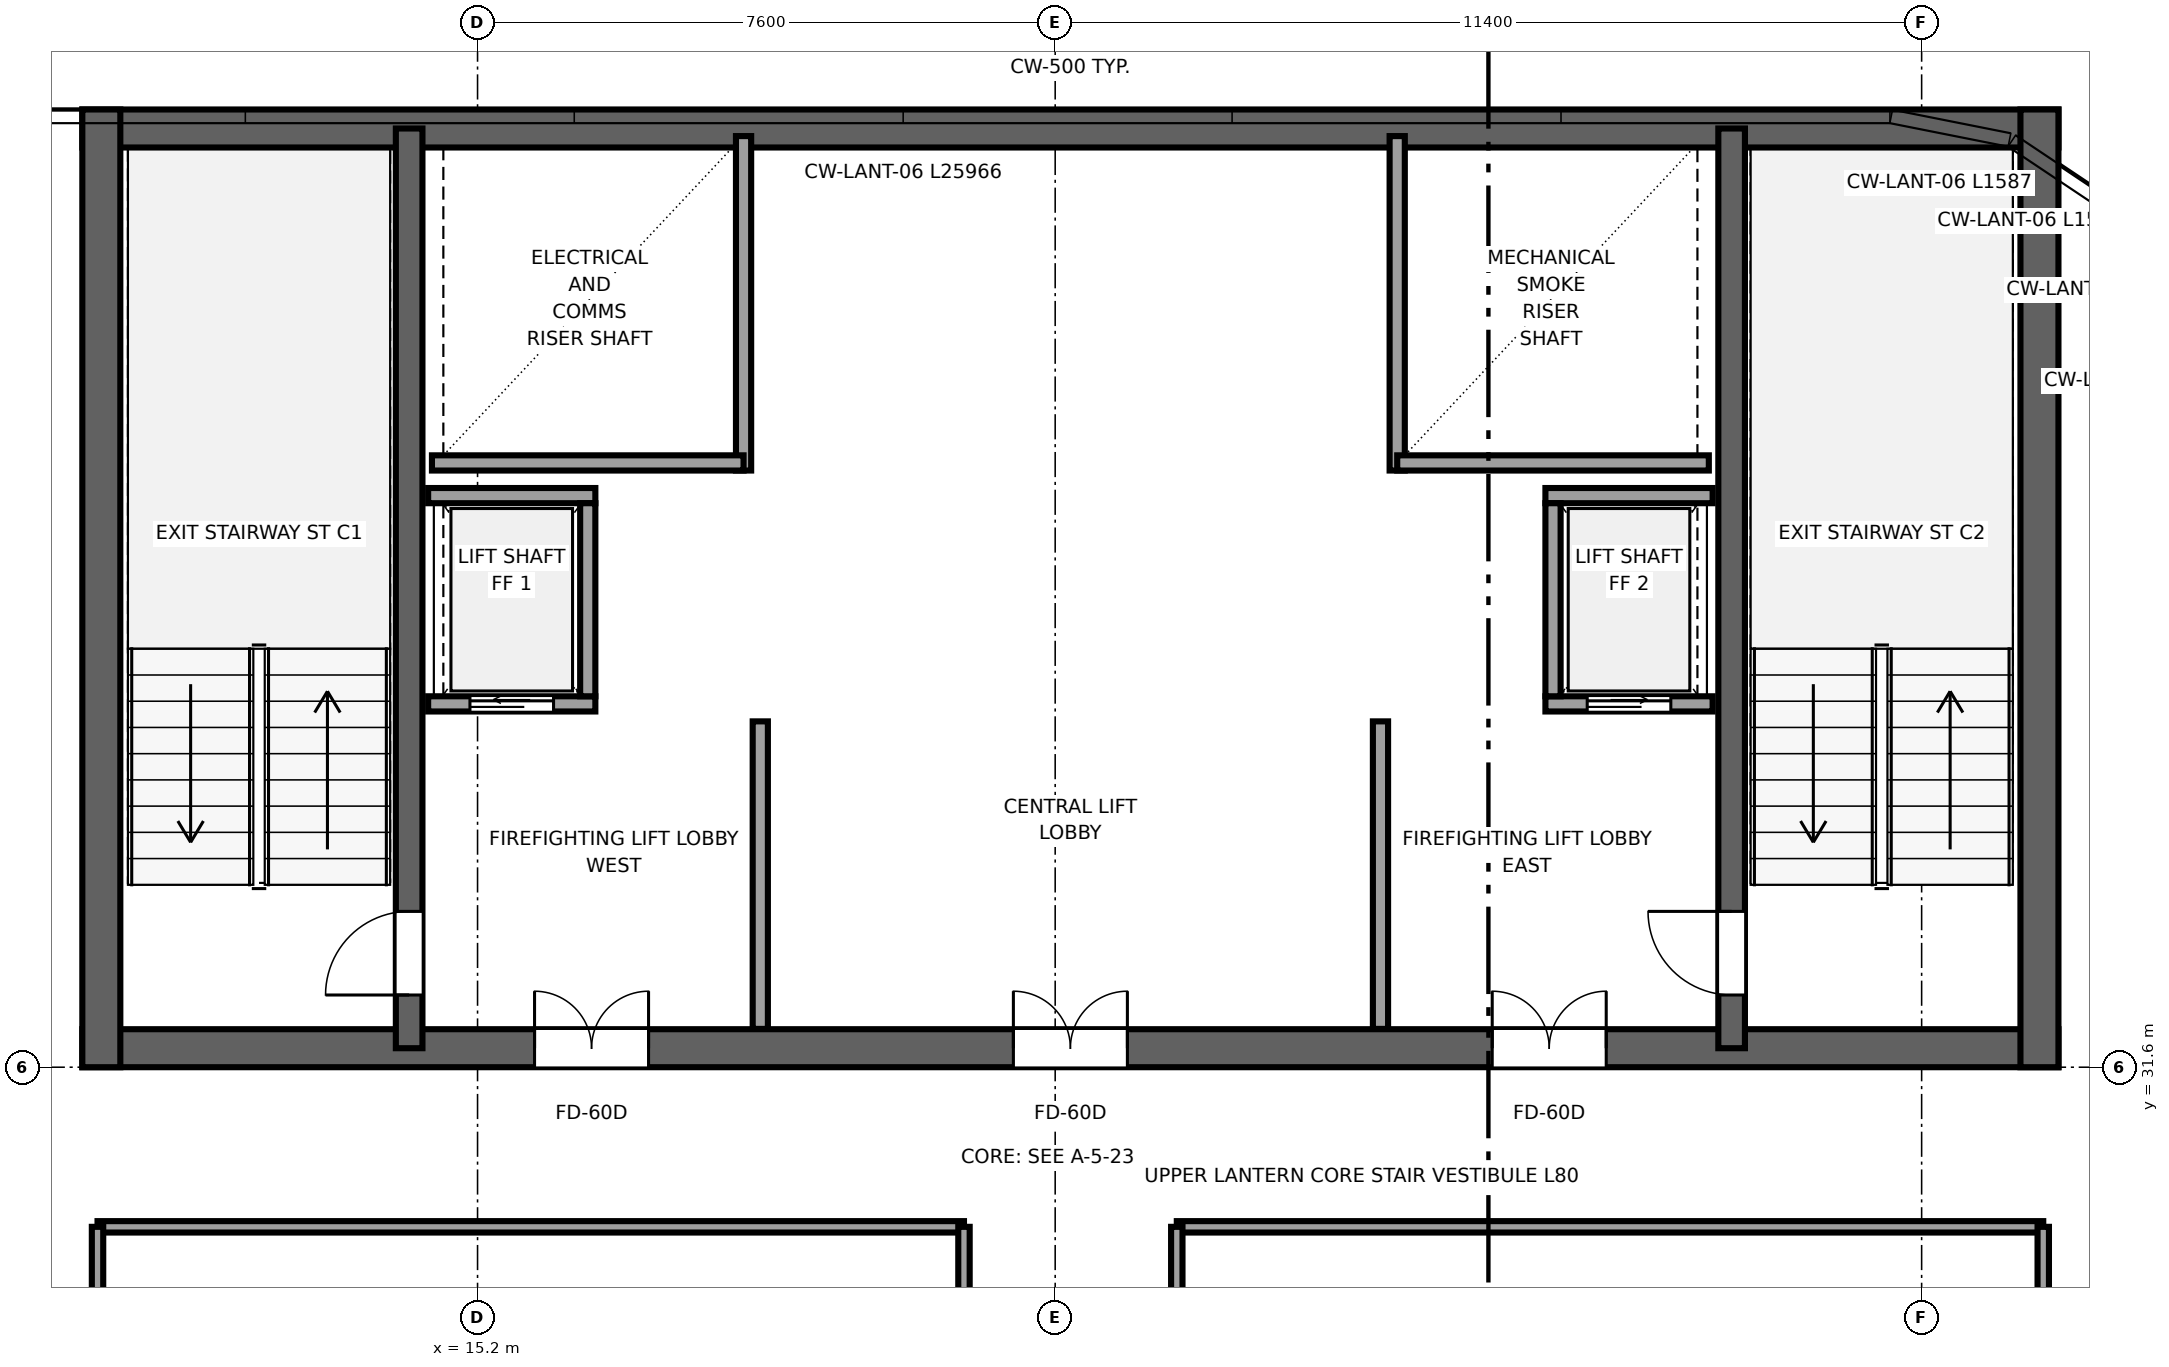
"""IFC4 building model, lengths in metres.
Left out: names, types, materials, properties, quantities, classifications, styles, units other than length and angle.
Written with IfcOpenShell. Run it as: python <this file> out.ifc"""

import sys

from ifc_helpers import new_model, si_unit, direction, frame, frame_2d, origin, place, context, subcontext, project, spatial, rectangle, extrude, source, transform, mapped, element, fill, save


model = new_model("IFC4")
c1 = context("Model", 3, precision=1e-05, world=origin(), true_north=direction((0.0, 1.0)))
c2 = subcontext(c1, "Body", "Model", "MODEL_VIEW")
j1 = project(units=[si_unit("LENGTHUNIT", "METRE"), si_unit("PLANEANGLEUNIT", "RADIAN")], contexts=[c1])
p1 = place(None, origin())
s1 = spatial("IfcSite", under=j1, at=p1, CompositionType="ELEMENT")
p2 = place(p1, origin())
s2 = spatial("IfcBuilding", under=s1, at=p2, CompositionType="ELEMENT")
p3 = place(p2, frame((0.0, 0.0, 302.35)))
s3 = spatial("IfcBuildingStorey", under=s2, at=p3, CompositionType="ELEMENT", Elevation=302.35)
p4 = place(p3, frame((10.0, 31.85, 0.0), z_axis=(0.0, 0.0, 1.0), x_axis=(1.0, 0.0, 0.0)))
e1 = element("IfcWall", 1, at=p4, inside=s3, PredefinedType="SHEAR", context=c2, shape_type="SweptSolid", body=[
    extrude(rectangle(XDim=26.0, YDim=0.5, at=frame_2d((13.0, 0.0))), origin(), (0.0, 0.0, 1.0), 3.8),
])
p5 = place(p4, frame((7.45, 0.0, 0.0), z_axis=(0.0, 0.0, 1.0), x_axis=(-1.0, 0.0, 0.0)))
e2 = element("IfcOpeningElement", 2, at=p5, cuts=e1, PredefinedType="OPENING", context=c2, shape_type="SweptSolid", body=[
    extrude(rectangle(XDim=1.5, YDim=2.04, at=frame_2d((0.75, 1.02))), frame((0.0, 0.26, 0.0), z_axis=(0.0, -1.0, 0.0), x_axis=(1.0, 0.0, 0.0)), (0.0, 0.0, 1.0), 0.52),
])
p6 = place(p4, frame((13.75, 0.0, 0.0), z_axis=(0.0, 0.0, 1.0), x_axis=(-1.0, 0.0, 0.0)))
e3 = element("IfcOpeningElement", 3, at=p6, cuts=e1, PredefinedType="OPENING", context=c2, shape_type="SweptSolid", body=[
    extrude(rectangle(XDim=1.5, YDim=2.04, at=frame_2d((0.75, 1.02))), frame((0.0, 0.26, 0.0), z_axis=(0.0, -1.0, 0.0), x_axis=(1.0, 0.0, 0.0)), (0.0, 0.0, 1.0), 0.52),
])
p7 = place(p4, frame((20.05, 0.0, 0.0), z_axis=(0.0, 0.0, 1.0), x_axis=(-1.0, 0.0, 0.0)))
e4 = element("IfcOpeningElement", 4, at=p7, cuts=e1, PredefinedType="OPENING", context=c2, shape_type="SweptSolid", body=[
    extrude(rectangle(XDim=1.5, YDim=2.04, at=frame_2d((0.75, 1.02))), frame((0.0, 0.26, 0.0), z_axis=(0.0, -1.0, 0.0), x_axis=(1.0, 0.0, 0.0)), (0.0, 0.0, 1.0), 0.52),
])
p8 = place(p3, frame((10.0, 43.95, 0.0), z_axis=(0.0, 0.0, 1.0), x_axis=(1.0, 0.0, 0.0)))
e5 = element("IfcWall", 5, at=p8, inside=s3, PredefinedType="SHEAR", context=c2, shape_type="SweptSolid", body=[
    extrude(rectangle(XDim=26.0, YDim=0.5, at=frame_2d((13.0, 0.0))), origin(), (0.0, 0.0, 1.0), 3.8),
])
for number, where, z_axis, x_axis in (
    (6, (10.25, 31.6, 0.0), (0.0, 0.0, 1.0), (0.0, 1.0, 0.0)),
    (7, (35.75, 31.6, 0.0), (0.0, 0.0, 1.0), (0.0, 1.0, 0.0)),
):
    element("IfcWall", number, at=place(p3, frame(where, z_axis=z_axis, x_axis=x_axis)), inside=s3, PredefinedType="SHEAR", context=c2, shape_type="SweptSolid", body=[
        extrude(rectangle(XDim=12.6, YDim=0.5, at=frame_2d((6.3, 0.0))), origin(), (0.0, 0.0, 1.0), 3.8),
    ])
p9 = place(p3, frame((14.3, 31.85, 0.0), z_axis=(0.0, 0.0, 1.0), x_axis=(0.0, 1.0, 0.0)))
e8 = element("IfcWall", 8, at=p9, inside=s3, PredefinedType="SHEAR", context=c2, shape_type="SweptSolid", body=[
    extrude(rectangle(XDim=12.1, YDim=0.35, at=frame_2d((6.05, 0.0))), origin(), (0.0, 0.0, 1.0), 3.8),
])
p10 = place(p9, frame((0.7, 0.0, 0.0)))
e9 = element("IfcOpeningElement", 9, at=p10, cuts=e8, PredefinedType="OPENING", context=c2, shape_type="SweptSolid", body=[
    extrude(rectangle(XDim=1.1, YDim=2.12, at=frame_2d((0.55, 1.06))), frame((0.0, 0.185, 0.0), z_axis=(0.0, -1.0, 0.0), x_axis=(1.0, 0.0, 0.0)), (0.0, 0.0, 1.0), 0.37),
])
p11 = place(p3, frame((31.7, 31.85, 0.0), z_axis=(0.0, 0.0, 1.0), x_axis=(0.0, 1.0, 0.0)))
e10 = element("IfcWall", 10, at=p11, inside=s3, PredefinedType="SHEAR", context=c2, shape_type="SweptSolid", body=[
    extrude(rectangle(XDim=12.1, YDim=0.35, at=frame_2d((6.05, 0.0))), origin(), (0.0, 0.0, 1.0), 3.8),
])
p12 = place(p11, frame((1.8, 0.0, 0.0), z_axis=(0.0, 0.0, 1.0), x_axis=(-1.0, 0.0, 0.0)))
e11 = element("IfcOpeningElement", 11, at=p12, cuts=e10, PredefinedType="OPENING", context=c2, shape_type="SweptSolid", body=[
    extrude(rectangle(XDim=1.1, YDim=2.12, at=frame_2d((0.55, 1.06))), frame((0.0, 0.185, 0.0), z_axis=(0.0, -1.0, 0.0), x_axis=(1.0, 0.0, 0.0)), (0.0, 0.0, 1.0), 0.37),
])
p13 = place(p3, frame((18.7, 39.45, 0.0), z_axis=(0.0, 0.0, 1.0), x_axis=(0.0, 1.0, 0.0)))
e12 = element("IfcWall", 12, at=p13, inside=s3, PredefinedType="SOLIDWALL", context=c2, shape_type="SweptSolid", body=[
    extrude(rectangle(XDim=4.4, YDim=0.2, at=frame_2d((2.2, 0.0))), origin(), (0.0, 0.0, 1.0), 3.58),
])
p14 = place(p3, frame((14.6, 39.55, 0.0), z_axis=(0.0, 0.0, 1.0), x_axis=(1.0, 0.0, 0.0)))
e13 = element("IfcWall", 13, at=p14, inside=s3, PredefinedType="SOLIDWALL", context=c2, shape_type="SweptSolid", body=[
    extrude(rectangle(XDim=4.1, YDim=0.2, at=frame_2d((2.05, 0.0))), origin(), (0.0, 0.0, 1.0), 3.58),
])
p15 = place(p3, frame((27.3, 39.45, 0.0), z_axis=(0.0, 0.0, 1.0), x_axis=(0.0, 1.0, 0.0)))
e14 = element("IfcWall", 14, at=p15, inside=s3, PredefinedType="SOLIDWALL", context=c2, shape_type="SweptSolid", body=[
    extrude(rectangle(XDim=4.4, YDim=0.2, at=frame_2d((2.2, 0.0))), origin(), (0.0, 0.0, 1.0), 3.58),
])
p16 = place(p3, frame((27.3, 39.55, 0.0), z_axis=(0.0, 0.0, 1.0), x_axis=(1.0, 0.0, 0.0)))
e15 = element("IfcWall", 15, at=p16, inside=s3, PredefinedType="SOLIDWALL", context=c2, shape_type="SweptSolid", body=[
    extrude(rectangle(XDim=4.1, YDim=0.2, at=frame_2d((2.05, 0.0))), origin(), (0.0, 0.0, 1.0), 3.58),
])
for number, where, z_axis, x_axis in (
    (16, (18.92, 32.104, 0.0), (0.0, 0.0, 1.0), (0.0, 1.0, 0.0)),
    (17, (27.08, 32.104, 0.0), (0.0, 0.0, 1.0), (0.0, 1.0, 0.0)),
):
    element("IfcWall", number, at=place(p3, frame(where, z_axis=z_axis, x_axis=x_axis)), inside=s3, PredefinedType="SOLIDWALL", context=c2, shape_type="SweptSolid", body=[
        extrude(rectangle(XDim=4.046, YDim=0.2, at=frame_2d((2.023, 0.0))), origin(), (0.0, 0.0, 1.0), 3.58),
    ])
p17 = place(p3, frame((29.25, 36.38, 0.0), z_axis=(0.0, 0.0, 1.0), x_axis=(1.0, 0.0, 0.0)))
e18 = element("IfcWall", 18, at=p17, inside=s3, PredefinedType="SOLIDWALL", context=c2, shape_type="SweptSolid", body=[
    extrude(rectangle(XDim=2.2, YDim=0.2, at=frame_2d((1.1, 0.0))), origin(), (0.0, 0.0, 1.0), 3.58),
])
p18 = place(p17, frame((0.55, 0.0, 0.0)))
e19 = element("IfcOpeningElement", 19, at=p18, cuts=e18, PredefinedType="OPENING", context=c2, shape_type="SweptSolid", body=[
    extrude(rectangle(XDim=1.1, YDim=2.12, at=frame_2d((0.55, 1.06))), frame((0.0, 0.11, 0.0), z_axis=(0.0, -1.0, 0.0), x_axis=(1.0, 0.0, 0.0)), (0.0, 0.0, 1.0), 0.22),
])
p19 = place(p3, frame((29.25, 39.12, 0.0), z_axis=(0.0, 0.0, 1.0), x_axis=(1.0, 0.0, 0.0)))
e20 = element("IfcWall", 20, at=p19, inside=s3, PredefinedType="SOLIDWALL", context=c2, shape_type="SweptSolid", body=[
    extrude(rectangle(XDim=2.2, YDim=0.2, at=frame_2d((1.1, 0.0))), origin(), (0.0, 0.0, 1.0), 3.58),
])
p20 = place(p3, frame((29.35, 36.48, 0.0), z_axis=(0.0, 0.0, 1.0), x_axis=(0.0, 1.0, 0.0)))
e21 = element("IfcWall", 21, at=p20, inside=s3, PredefinedType="SOLIDWALL", context=c2, shape_type="SweptSolid", body=[
    extrude(rectangle(XDim=2.54, YDim=0.2, at=frame_2d((1.27, 0.0))), origin(), (0.0, 0.0, 1.0), 3.58),
])
p21 = place(p3, frame((14.55, 36.38, 0.0), z_axis=(0.0, 0.0, 1.0), x_axis=(1.0, 0.0, 0.0)))
e22 = element("IfcWall", 22, at=p21, inside=s3, PredefinedType="SOLIDWALL", context=c2, shape_type="SweptSolid", body=[
    extrude(rectangle(XDim=2.2, YDim=0.2, at=frame_2d((1.1, 0.0))), origin(), (0.0, 0.0, 1.0), 3.58),
])
p22 = place(p21, frame((0.55, 0.0, 0.0)))
e23 = element("IfcOpeningElement", 23, at=p22, cuts=e22, PredefinedType="OPENING", context=c2, shape_type="SweptSolid", body=[
    extrude(rectangle(XDim=1.1, YDim=2.12, at=frame_2d((0.55, 1.06))), frame((0.0, 0.11, 0.0), z_axis=(0.0, -1.0, 0.0), x_axis=(1.0, 0.0, 0.0)), (0.0, 0.0, 1.0), 0.22),
])
p23 = place(p3, frame((14.55, 39.12, 0.0), z_axis=(0.0, 0.0, 1.0), x_axis=(1.0, 0.0, 0.0)))
e24 = element("IfcWall", 24, at=p23, inside=s3, PredefinedType="SOLIDWALL", context=c2, shape_type="SweptSolid", body=[
    extrude(rectangle(XDim=2.2, YDim=0.2, at=frame_2d((1.1, 0.0))), origin(), (0.0, 0.0, 1.0), 3.58),
])
p24 = place(p3, frame((16.65, 36.48, 0.0), z_axis=(0.0, 0.0, 1.0), x_axis=(0.0, 1.0, 0.0)))
e25 = element("IfcWall", 25, at=p24, inside=s3, PredefinedType="SOLIDWALL", context=c2, shape_type="SweptSolid", body=[
    extrude(rectangle(XDim=2.54, YDim=0.2, at=frame_2d((1.27, 0.0))), origin(), (0.0, 0.0, 1.0), 3.58),
])
p25 = place(p3, frame((10.2, 29.5, 0.0), z_axis=(0.0, 0.0, 1.0), x_axis=(1.0, 0.0, 0.0)))
e26 = element("IfcWall", 26, at=p25, inside=s3, PredefinedType="PARTITIONING", context=c2, shape_type="SweptSolid", body=[
    extrude(rectangle(XDim=11.4, YDim=0.15, at=frame_2d((5.7, 0.0))), origin(), (0.0, 0.0, 1.0), 3.58),
])
for number, where, z_axis, x_axis in (
    (27, (10.2, 22.0, 0.0), (0.0, 0.0, 1.0), (0.0, 1.0, 0.0)),
    (28, (21.6, 22.0, 0.0), (0.0, 0.0, 1.0), (0.0, 1.0, 0.0)),
):
    element("IfcWall", number, at=place(p3, frame(where, z_axis=z_axis, x_axis=x_axis)), inside=s3, PredefinedType="PARTITIONING", context=c2, shape_type="SweptSolid", body=[
        extrude(rectangle(XDim=7.5, YDim=0.15, at=frame_2d((3.75, 0.0))), origin(), (0.0, 0.0, 1.0), 3.58),
    ])
p26 = place(p3, frame((24.4, 29.5, 0.0), z_axis=(0.0, 0.0, 1.0), x_axis=(1.0, 0.0, 0.0)))
e29 = element("IfcWall", 29, at=p26, inside=s3, PredefinedType="PARTITIONING", context=c2, shape_type="SweptSolid", body=[
    extrude(rectangle(XDim=11.4, YDim=0.15, at=frame_2d((5.7, 0.0))), origin(), (0.0, 0.0, 1.0), 3.58),
])
for number, where, z_axis, x_axis in (
    (30, (24.4, 22.0, 0.0), (0.0, 0.0, 1.0), (0.0, 1.0, 0.0)),
    (31, (35.8, 22.0, 0.0), (0.0, 0.0, 1.0), (0.0, 1.0, 0.0)),
):
    element("IfcWall", number, at=place(p3, frame(where, z_axis=z_axis, x_axis=x_axis)), inside=s3, PredefinedType="PARTITIONING", context=c2, shape_type="SweptSolid", body=[
        extrude(rectangle(XDim=7.5, YDim=0.15, at=frame_2d((3.75, 0.0))), origin(), (0.0, 0.0, 1.0), 3.58),
    ])
m1 = source(origin(), c2, "Body", "SweptSolid", [
    extrude(rectangle(XDim=1.1, YDim=2.12, at=frame_2d((0.55, 1.06))), frame((0.0, 0.025, 0.0), z_axis=(0.0, -1.0, 0.0), x_axis=(1.0, 0.0, 0.0)), (0.0, 0.0, 1.0), 0.05),
])
p27 = place(p10, origin())
e32 = element("IfcDoor", 32, at=p27, inside=s3, OperationType="SINGLE_SWING_LEFT", PredefinedType="DOOR", context=c2, shape_type="MappedRepresentation", body=[
    mapped(m1, transform((0.0, 0.0, 0.0), x_axis=(1.0, 0.0, 0.0), y_axis=(0.0, 1.0, 0.0), z_axis=(0.0, 0.0, 1.0), scale=1.0)),
])
fill(e9, e32)
p28 = place(p12, origin())
e33 = element("IfcDoor", 33, at=p28, inside=s3, OperationType="SINGLE_SWING_RIGHT", PredefinedType="DOOR", context=c2, shape_type="MappedRepresentation", body=[
    mapped(m1, transform((0.0, 0.0, 0.0), x_axis=(1.0, 0.0, 0.0), y_axis=(0.0, 1.0, 0.0), z_axis=(0.0, 0.0, 1.0), scale=1.0)),
])
fill(e11, e33)
m2 = source(origin(), c2, "Body", "SweptSolid", [
    extrude(rectangle(XDim=1.5, YDim=2.04, at=frame_2d((0.75, 1.02))), frame((0.0, 0.025, 0.0), z_axis=(0.0, -1.0, 0.0), x_axis=(1.0, 0.0, 0.0)), (0.0, 0.0, 1.0), 0.05),
])
p29 = place(p5, origin())
e34 = element("IfcDoor", 34, at=p29, inside=s3, OperationType="DOUBLE_DOOR_SINGLE_SWING", PredefinedType="DOOR", context=c2, shape_type="MappedRepresentation", body=[
    mapped(m2, transform((0.0, 0.0, 0.0), x_axis=(1.0, 0.0, 0.0), y_axis=(0.0, 1.0, 0.0), z_axis=(0.0, 0.0, 1.0), scale=1.0)),
])
fill(e2, e34)
p30 = place(p6, origin())
e35 = element("IfcDoor", 35, at=p30, inside=s3, OperationType="DOUBLE_DOOR_SINGLE_SWING", PredefinedType="DOOR", context=c2, shape_type="MappedRepresentation", body=[
    mapped(m2, transform((0.0, 0.0, 0.0), x_axis=(1.0, 0.0, 0.0), y_axis=(0.0, 1.0, 0.0), z_axis=(0.0, 0.0, 1.0), scale=1.0)),
])
fill(e3, e35)
p31 = place(p7, origin())
e36 = element("IfcDoor", 36, at=p31, inside=s3, OperationType="DOUBLE_DOOR_SINGLE_SWING", PredefinedType="DOOR", context=c2, shape_type="MappedRepresentation", body=[
    mapped(m2, transform((0.0, 0.0, 0.0), x_axis=(1.0, 0.0, 0.0), y_axis=(0.0, 1.0, 0.0), z_axis=(0.0, 0.0, 1.0), scale=1.0)),
])
fill(e4, e36)
m3 = source(origin(), c2, "Body", "SweptSolid", [
    extrude(rectangle(XDim=1.1, YDim=2.12, at=frame_2d((0.55, 1.06))), frame((0.0, 0.025, 0.0), z_axis=(0.0, -1.0, 0.0), x_axis=(1.0, 0.0, 0.0)), (0.0, 0.0, 1.0), 0.05),
])
p32 = place(p18, origin())
e37 = element("IfcDoor", 37, at=p32, inside=s3, OperationType="SLIDING_TO_RIGHT", PredefinedType="DOOR", context=c2, shape_type="MappedRepresentation", body=[
    mapped(m3, transform((0.0, 0.0, 0.0), x_axis=(1.0, 0.0, 0.0), y_axis=(0.0, 1.0, 0.0), z_axis=(0.0, 0.0, 1.0), scale=1.0)),
])
fill(e19, e37)
p33 = place(p22, origin())
e38 = element("IfcDoor", 38, at=p33, inside=s3, OperationType="SLIDING_TO_LEFT", PredefinedType="DOOR", context=c2, shape_type="MappedRepresentation", body=[
    mapped(m3, transform((0.0, 0.0, 0.0), x_axis=(1.0, 0.0, 0.0), y_axis=(0.0, 1.0, 0.0), z_axis=(0.0, 0.0, 1.0), scale=1.0)),
])
fill(e23, e38)
save(model, sys.argv[1])
